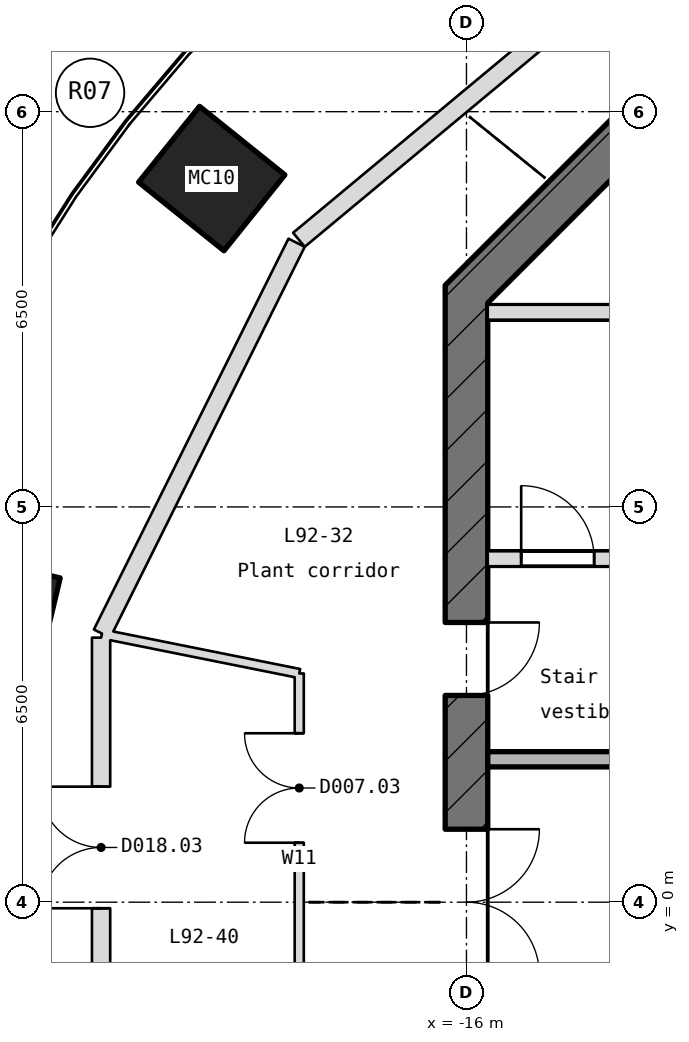
"""IFC4 building model, lengths in metres.
Left out: names, types, materials, properties, quantities, classifications, styles, units other than length and angle.
Written with IfcOpenShell. Run it as: python <this file> out.ifc"""

import sys

from ifc_helpers import new_model, si_unit, direction, frame, frame_2d, origin, place, context, subcontext, project, spatial, polyline, rectangle, outline, extrude, element, fill, save


model = new_model("IFC4")
c1 = context("Model", 3, precision=1e-05, world=origin(), true_north=direction((0.0, 1.0)))
c2 = subcontext(c1, "Body", "Model", "MODEL_VIEW")
j1 = project(units=[si_unit("LENGTHUNIT", "METRE"), si_unit("PLANEANGLEUNIT", "RADIAN")], contexts=[c1])
p1 = place(None, origin())
s1 = spatial("IfcSite", under=j1, at=p1, CompositionType="ELEMENT")
p2 = place(p1, origin())
s2 = spatial("IfcBuilding", under=s1, at=p2, CompositionType="ELEMENT")
p3 = place(p2, frame((0.0, 0.0, 407.55)))
s3 = spatial("IfcBuildingStorey", under=s2, at=p3, CompositionType="ELEMENT", Elevation=407.55)
p4 = place(p3, frame((0.0, 0.0, -0.3)))
e1 = element("IfcColumn", 1, at=p4, inside=s3, PredefinedType="COLUMN", context=c2, shape_type="SweptSolid", body=[
    extrude(outline(polyline([(-19.621, 10.51), (-19.988, 10.713), (-21.392, 11.84), (-20.39, 13.088), (-20.022, 12.885), (-18.619, 11.758), (-19.621, 10.51)])), origin(), (0.0, 0.0, 1.0), 6.1),
])
p5 = place(p3, frame((0.0, 0.0, -0.3)))
e2 = element("IfcColumn", 2, at=p5, inside=s3, PredefinedType="COLUMN", context=c2, shape_type="SweptSolid", body=[
    extrude(outline(polyline([(-22.62, 3.704), (-23.053, 3.775), (-24.804, 4.194), (-24.432, 5.75), (-23.999, 5.679), (-22.248, 5.26), (-22.62, 3.704)])), origin(), (0.0, 0.0, 1.0), 6.1),
])
p6 = place(p3, frame((-12.897, 13.103, -0.3), z_axis=(0.0, 0.0, 1.0), x_axis=(-0.707106781187, -0.707106781187, 0.0)))
e3 = element("IfcWall", 3, at=p6, inside=s3, PredefinedType="SHEAR", context=c2, shape_type="SweptSolid", body=[
    extrude(rectangle(XDim=4.533, YDim=0.7, at=frame_2d((2.266, 0.0))), origin(), (0.0, 0.0, 1.0), 6.1),
])
p7 = place(p3, frame((-16.0, 10.145, -0.3), z_axis=(0.0, 0.0, 1.0), x_axis=(0.0, -1.0, 0.0)))
e4 = element("IfcWall", 4, at=p7, inside=s3, PredefinedType="SHEAR", context=c2, shape_type="SweptSolid", body=[
    extrude(rectangle(XDim=20.29, YDim=0.7, at=frame_2d((10.145, 0.0))), origin(), (0.0, 0.0, 1.0), 6.1),
])
p8 = place(p7, frame((8.945, 0.0, 0.3)))
e5 = element("IfcOpeningElement", 5, at=p8, cuts=e4, PredefinedType="OPENING", context=c2, shape_type="SweptSolid", body=[
    extrude(rectangle(XDim=2.4, YDim=2.1, at=frame_2d((1.2, 1.05))), frame((0.0, 0.36, 0.0), z_axis=(0.0, -1.0, 0.0), x_axis=(1.0, 0.0, 0.0)), (0.0, 0.0, 1.0), 0.72),
])
p9 = place(p7, frame((5.545, 0.0, 0.3)))
e6 = element("IfcOpeningElement", 6, at=p9, cuts=e4, PredefinedType="OPENING", context=c2, shape_type="SweptSolid", body=[
    extrude(rectangle(XDim=1.2, YDim=2.1, at=frame_2d((0.6, 1.05))), frame((0.0, 0.36, 0.0), z_axis=(0.0, -1.0, 0.0), x_axis=(1.0, 0.0, 0.0)), (0.0, 0.0, 1.0), 0.72),
])
p10 = place(p3, frame((-15.65, 2.35, 0.0), z_axis=(0.0, 0.0, 1.0), x_axis=(1.0, 0.0, 0.0)))
e7 = element("IfcWall", 7, at=p10, inside=s3, PredefinedType="STANDARD", context=c2, shape_type="SweptSolid", body=[
    extrude(rectangle(XDim=7.25, YDim=0.25, at=frame_2d((3.625, 0.0))), origin(), (0.0, 0.0, 1.0), 5.8),
])
p11 = place(p3, frame((-15.65, 5.65, -0.3), z_axis=(0.0, 0.0, 1.0), x_axis=(1.0, 0.0, 0.0)))
e8 = element("IfcWall", 8, at=p11, inside=s3, PredefinedType="SHEAR", context=c2, shape_type="SweptSolid", body=[
    extrude(rectangle(XDim=7.1, YDim=0.25, at=frame_2d((3.55, 0.0))), origin(), (0.0, 0.0, 1.0), 6.1),
])
p12 = place(p11, frame((0.55, 0.0, 0.3)))
e9 = element("IfcOpeningElement", 9, at=p12, cuts=e8, PredefinedType="OPENING", context=c2, shape_type="SweptSolid", body=[
    extrude(rectangle(XDim=1.2, YDim=2.1, at=frame_2d((0.6, 1.05))), frame((0.0, 0.135, 0.0), z_axis=(0.0, -1.0, 0.0), x_axis=(1.0, 0.0, 0.0)), (0.0, 0.0, 1.0), 0.27),
])
p13 = place(p3, frame((-15.65, 9.7, -0.3), z_axis=(0.0, 0.0, 1.0), x_axis=(1.0, 0.0, 0.0)))
e10 = element("IfcWall", 10, at=p13, inside=s3, PredefinedType="SHEAR", context=c2, shape_type="SweptSolid", body=[
    extrude(rectangle(XDim=7.1, YDim=0.25, at=frame_2d((3.55, 0.0))), origin(), (0.0, 0.0, 1.0), 6.1),
])
p14 = place(p3, frame((-22.009, -2.551, 0.0), z_axis=(0.0, 0.0, 1.0), x_axis=(0.0, 1.0, 0.0)))
e11 = element("IfcWall", 11, at=p14, inside=s3, PredefinedType="STANDARD", context=c2, shape_type="SweptSolid", body=[
    extrude(rectangle(XDim=6.901, YDim=0.3, at=frame_2d((3.451, 0.0))), origin(), (0.0, 0.0, 1.0), 5.8),
])
p15 = place(p14, frame((2.45, 0.0, 0.0)))
e12 = element("IfcOpeningElement", 12, at=p15, cuts=e11, PredefinedType="OPENING", context=c2, shape_type="SweptSolid", body=[
    extrude(rectangle(XDim=2.0, YDim=2.1, at=frame_2d((1.0, 1.05))), frame((0.0, 0.16, 0.0), z_axis=(0.0, -1.0, 0.0), x_axis=(1.0, 0.0, 0.0)), (0.0, 0.0, 1.0), 0.32),
])
p16 = place(p3, frame((-18.755, 10.893, 0.0), z_axis=(0.0, 0.0, 1.0), x_axis=(0.768712832432, 0.639594075375, 0.0)))
e13 = element("IfcWall", 13, at=p16, inside=s3, PredefinedType="STANDARD", context=c2, shape_type="SweptSolid", body=[
    extrude(rectangle(XDim=7.813, YDim=0.3, at=frame_2d((3.906, 0.0))), origin(), (0.0, 0.0, 1.0), 5.8),
])
p17 = place(p3, frame((-21.993, 4.417, 0.0), z_axis=(0.0, 0.0, 1.0), x_axis=(0.445648754576, 0.895207901856, 0.0)))
e14 = element("IfcWall", 14, at=p17, inside=s3, PredefinedType="STANDARD", context=c2, shape_type="SweptSolid", body=[
    extrude(rectangle(XDim=7.18, YDim=0.3, at=frame_2d((3.59, 0.0))), origin(), (0.0, 0.0, 1.0), 5.8),
])
p18 = place(p3, frame((-18.75, -2.34, 0.0), z_axis=(0.0, 0.0, 1.0), x_axis=(0.0, 1.0, 0.0)))
e15 = element("IfcWall", 15, at=p18, inside=s3, PredefinedType="PARTITIONING", context=c2, shape_type="SweptSolid", body=[
    extrude(rectangle(XDim=6.101, YDim=0.15, at=frame_2d((3.051, 0.0))), origin(), (0.0, 0.0, 1.0), 5.8),
])
p19 = place(p18, frame((3.318, 0.0, 0.0)))
e16 = element("IfcOpeningElement", 16, at=p19, cuts=e15, PredefinedType="OPENING", context=c2, shape_type="SweptSolid", body=[
    extrude(rectangle(XDim=1.8, YDim=2.1, at=frame_2d((0.9, 1.05))), frame((0.0, 0.085, 0.0), z_axis=(0.0, -1.0, 0.0), x_axis=(1.0, 0.0, 0.0)), (0.0, 0.0, 1.0), 0.17),
])
p20 = place(p3, frame((-18.75, 3.761, 0.0), z_axis=(0.0, 0.0, 1.0), x_axis=(-0.980469907143, 0.196669166843, 0.0)))
e17 = element("IfcWall", 17, at=p20, inside=s3, PredefinedType="PARTITIONING", context=c2, shape_type="SweptSolid", body=[
    extrude(rectangle(XDim=3.311, YDim=0.15, at=frame_2d((1.655, 0.0))), origin(), (0.0, 0.0, 1.0), 5.383),
])
p21 = place(p12, origin())
e18 = element("IfcDoor", 18, at=p21, inside=s3, OperationType="SINGLE_SWING_RIGHT", PredefinedType="DOOR", context=c2, shape_type="SweptSolid", body=[
    extrude(rectangle(XDim=1.2, YDim=2.1, at=frame_2d((0.6, 1.05))), frame((0.0, 0.025, 0.0), z_axis=(0.0, -1.0, 0.0), x_axis=(1.0, 0.0, 0.0)), (0.0, 0.0, 1.0), 0.05),
])
fill(e9, e18)
p22 = place(p8, origin())
e19 = element("IfcDoor", 19, at=p22, inside=s3, OperationType="DOUBLE_DOOR_SINGLE_SWING", PredefinedType="DOOR", context=c2, shape_type="SweptSolid", body=[
    extrude(rectangle(XDim=2.4, YDim=2.1, at=frame_2d((1.2, 1.05))), frame((0.0, 0.025, 0.0), z_axis=(0.0, -1.0, 0.0), x_axis=(1.0, 0.0, 0.0)), (0.0, 0.0, 1.0), 0.05),
])
fill(e5, e19)
p23 = place(p9, origin())
e20 = element("IfcDoor", 20, at=p23, inside=s3, OperationType="SINGLE_SWING_RIGHT", PredefinedType="DOOR", context=c2, shape_type="SweptSolid", body=[
    extrude(rectangle(XDim=1.2, YDim=2.1, at=frame_2d((0.6, 1.05))), frame((0.0, 0.025, 0.0), z_axis=(0.0, -1.0, 0.0), x_axis=(1.0, 0.0, 0.0)), (0.0, 0.0, 1.0), 0.05),
])
fill(e6, e20)
p24 = place(p19, origin())
e21 = element("IfcDoor", 21, at=p24, inside=s3, OperationType="DOUBLE_DOOR_SINGLE_SWING", PredefinedType="DOOR", context=c2, shape_type="SweptSolid", body=[
    extrude(rectangle(XDim=1.8, YDim=2.1, at=frame_2d((0.9, 1.05))), frame((0.0, 0.025, 0.0), z_axis=(0.0, -1.0, 0.0), x_axis=(1.0, 0.0, 0.0)), (0.0, 0.0, 1.0), 0.05),
])
fill(e16, e21)
p25 = place(p15, origin())
e22 = element("IfcDoor", 22, at=p25, inside=s3, OperationType="DOUBLE_DOOR_SINGLE_SWING", PredefinedType="DOOR", context=c2, shape_type="SweptSolid", body=[
    extrude(rectangle(XDim=2.0, YDim=2.1, at=frame_2d((1.0, 1.05))), frame((0.0, 0.025, 0.0), z_axis=(0.0, -1.0, 0.0), x_axis=(1.0, 0.0, 0.0)), (0.0, 0.0, 1.0), 0.05),
])
fill(e12, e22)
save(model, sys.argv[1])
